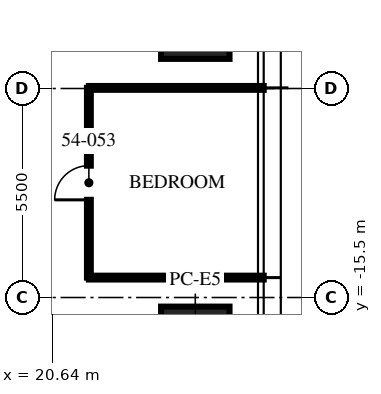
"""IFC4 building model, lengths in metres.
Left out: names, types, materials, properties, quantities, classifications, styles, units other than length and angle.
Written with IfcOpenShell. Run it as: python <this file> out.ifc"""

import sys

from ifc_helpers import new_model, si_unit, direction, frame, frame_2d, origin, origin_2d, place, context, subcontext, project, spatial, rectangle, extrude, element, fill, save


model = new_model("IFC4")
c1 = context("Model", 3, precision=1e-05, world=origin(), true_north=direction((0.0, 1.0)))
c2 = subcontext(c1, "Body", "Model", "MODEL_VIEW")
j1 = project(units=[si_unit("LENGTHUNIT", "METRE"), si_unit("PLANEANGLEUNIT", "RADIAN")], contexts=[c1])
p1 = place(None, origin())
s1 = spatial("IfcSite", under=j1, at=p1, CompositionType="ELEMENT")
p2 = place(p1, origin())
s2 = spatial("IfcBuilding", under=s1, at=p2, CompositionType="ELEMENT")
p3 = place(p2, frame((0.0, 0.0, 218.25)))
s3 = spatial("IfcBuildingStorey", under=s2, at=p3, CompositionType="ELEMENT", Elevation=218.25)
for number, where, z_axis, x_axis in (
    (1, (24.4, -8.32, 0.0), (0.0, 0.0, 1.0), (0.0, 1.0, 0.0)),
    (2, (24.4, -16.64, 0.0), (0.0, 0.0, 1.0), (0.0, 1.0, 0.0)),
):
    element("IfcColumn", number, at=place(p3, frame(where, z_axis=z_axis, x_axis=x_axis)), inside=s3, PredefinedType="COLUMN", context=c2, shape_type="SweptSolid", body=[
        extrude(rectangle(XDim=1.8, YDim=1.8, at=origin_2d()), origin(), (0.0, 0.0, 1.0), 3.75),
    ])
for number, where, z_axis, x_axis in (
    (3, (21.6, -14.976, 0.0), (0.0, 0.0, 1.0), (1.0, 0.0, 0.0)),
    (4, (21.6, -9.984, 0.0), (0.0, 0.0, 1.0), (1.0, 0.0, 0.0)),
):
    element("IfcWall", number, at=place(p3, frame(where, z_axis=z_axis, x_axis=x_axis)), inside=s3, PredefinedType="PARTITIONING", context=c2, shape_type="SweptSolid", body=[
        extrude(rectangle(XDim=4.6, YDim=0.1, at=frame_2d((2.3, 0.0))), origin(), (0.0, 0.0, 1.0), 2.91),
    ])
p4 = place(p3, frame((21.6, -14.976, 0.0), z_axis=(0.0, 0.0, 1.0), x_axis=(0.0, 1.0, 0.0)))
e5 = element("IfcWall", 5, at=p4, inside=s3, PredefinedType="PARTITIONING", context=c2, shape_type="SweptSolid", body=[
    extrude(rectangle(XDim=4.992, YDim=0.1, at=frame_2d((2.496, 0.0))), origin(), (0.0, 0.0, 1.0), 2.81),
])
p5 = place(p4, frame((2.046, 0.0, 0.0)))
e6 = element("IfcOpeningElement", 6, at=p5, cuts=e5, PredefinedType="OPENING", context=c2, shape_type="SweptSolid", body=[
    extrude(rectangle(XDim=0.9, YDim=2.1, at=frame_2d((0.45, 1.05))), frame((0.0, 0.06, 0.0), z_axis=(0.0, -1.0, 0.0), x_axis=(1.0, 0.0, 0.0)), (0.0, 0.0, 1.0), 0.12),
])
p6 = place(p5, origin())
e7 = element("IfcDoor", 7, at=p6, inside=s3, OperationType="SINGLE_SWING_LEFT", PredefinedType="DOOR", context=c2, shape_type="SweptSolid", body=[
    extrude(rectangle(XDim=0.9, YDim=2.1, at=frame_2d((0.45, 1.05))), frame((0.0, 0.025, 0.0), z_axis=(0.0, -1.0, 0.0), x_axis=(1.0, 0.0, 0.0)), (0.0, 0.0, 1.0), 0.05),
])
fill(e6, e7)
save(model, sys.argv[1])
